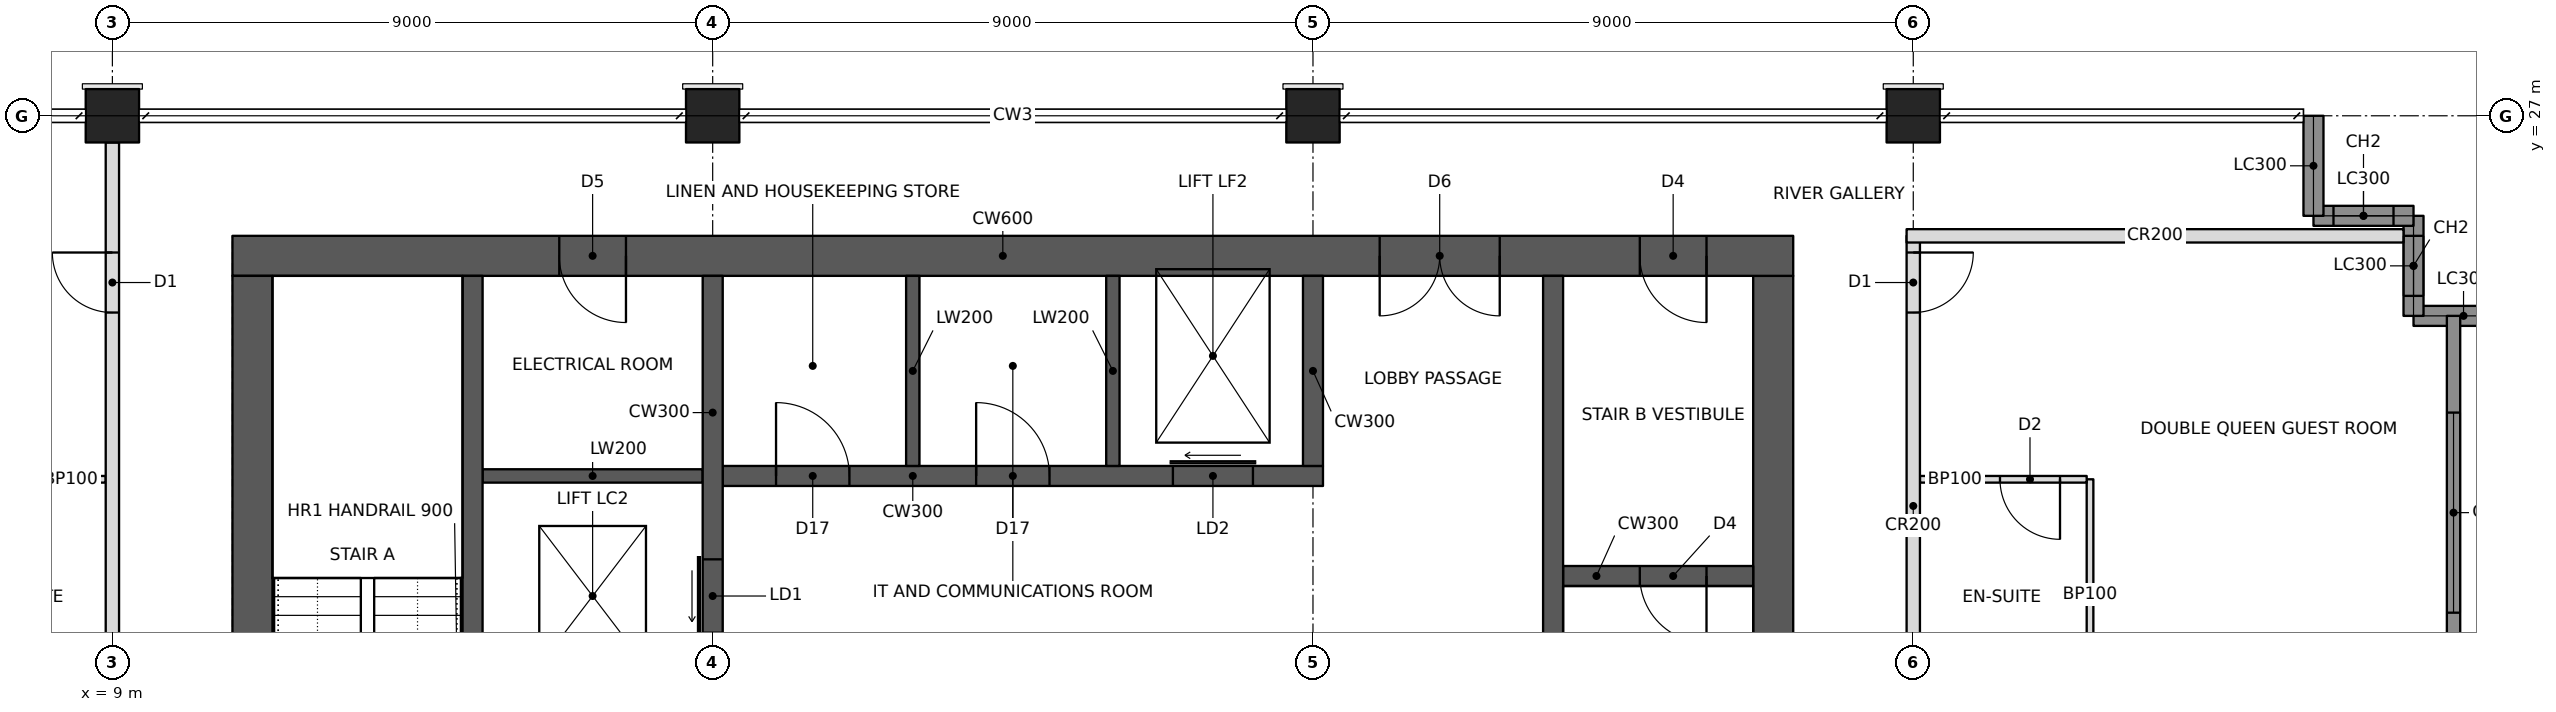
"""IFC4 building model, lengths in metres.
Left out: names, types, materials, properties, quantities, classifications, styles, units other than length and angle.
Written with IfcOpenShell. Run it as: python <this file> out.ifc"""

import sys

from ifc_helpers import new_model, si_unit, direction, frame, frame_2d, origin, origin_2d, place, context, subcontext, project, spatial, rectangle, hollow_rectangle, extrude, element, fill, save


model = new_model("IFC4")
c1 = context("Model", 3, precision=1e-05, world=origin(), true_north=direction((0.0, 1.0)))
c2 = subcontext(c1, "Body", "Model", "MODEL_VIEW")
j1 = project(units=[si_unit("LENGTHUNIT", "METRE"), si_unit("PLANEANGLEUNIT", "RADIAN")], contexts=[c1])
p1 = place(None, origin())
s1 = spatial("IfcSite", under=j1, at=p1, CompositionType="ELEMENT")
p2 = place(p1, origin())
s2 = spatial("IfcBuilding", under=s1, at=p2, CompositionType="ELEMENT")
p3 = place(p2, frame((0.0, 0.0, 201.2)))
s3 = spatial("IfcBuildingStorey", under=s2, at=p3, CompositionType="ELEMENT", Elevation=201.2)
for number, where, z_axis, x_axis in (
    (1, (9.0, 27.0, 0.0), (0.0, 0.0, 1.0), (1.0, 0.0, 0.0)),
    (2, (18.0, 27.0, 0.0), (0.0, 0.0, 1.0), (1.0, 0.0, 0.0)),
    (3, (27.0, 27.0, 0.0), (0.0, 0.0, 1.0), (1.0, 0.0, 0.0)),
    (4, (36.0, 27.0, 0.0), (0.0, 0.0, 1.0), (1.0, 0.0, 0.0)),
):
    element("IfcColumn", number, at=place(p3, frame(where, z_axis=z_axis, x_axis=x_axis)), inside=s3, PredefinedType="COLUMN", context=c2, shape_type="SweptSolid", body=[
        extrude(hollow_rectangle(XDim=0.8, YDim=0.8, WallThickness=0.06, at=origin_2d()), origin(), (0.0, 0.0, 1.0), 3.4),
    ])
p4 = place(p3, frame((10.8, 24.9, 0.0), z_axis=(0.0, 0.0, 1.0), x_axis=(1.0, 0.0, 0.0)))
e5 = element("IfcWall", 5, at=p4, inside=s3, PredefinedType="SHEAR", context=c2, shape_type="SweptSolid", body=[
    extrude(rectangle(XDim=23.4, YDim=0.6, at=frame_2d((11.7, 0.0))), origin(), (0.0, 0.0, 1.0), 3.4),
])
p5 = place(p4, frame((17.2, 0.0, 0.0)))
e6 = element("IfcOpeningElement", 6, at=p5, cuts=e5, PredefinedType="OPENING", context=c2, shape_type="SweptSolid", body=[
    extrude(rectangle(XDim=1.8, YDim=2.1, at=frame_2d((0.9, 1.05))), frame((0.0, 0.31, 0.0), z_axis=(0.0, -1.0, 0.0), x_axis=(1.0, 0.0, 0.0)), (0.0, 0.0, 1.0), 0.62),
])
p6 = place(p4, frame((21.1, 0.0, 0.0)))
e7 = element("IfcOpeningElement", 7, at=p6, cuts=e5, PredefinedType="OPENING", context=c2, shape_type="SweptSolid", body=[
    extrude(rectangle(XDim=1.0, YDim=2.1, at=frame_2d((0.5, 1.05))), frame((0.0, 0.31, 0.0), z_axis=(0.0, -1.0, 0.0), x_axis=(1.0, 0.0, 0.0)), (0.0, 0.0, 1.0), 0.62),
])
p7 = place(p4, frame((4.9, 0.0, 0.0)))
e8 = element("IfcOpeningElement", 8, at=p7, cuts=e5, PredefinedType="OPENING", context=c2, shape_type="SweptSolid", body=[
    extrude(rectangle(XDim=1.0, YDim=2.1, at=frame_2d((0.5, 1.05))), frame((0.0, 0.31, 0.0), z_axis=(0.0, -1.0, 0.0), x_axis=(1.0, 0.0, 0.0)), (0.0, 0.0, 1.0), 0.62),
])
for number, where, z_axis, x_axis in (
    (9, (11.1, 11.4, 0.0), (0.0, 0.0, 1.0), (0.0, 1.0, 0.0)),
    (10, (33.9, 11.4, 0.0), (0.0, 0.0, 1.0), (0.0, 1.0, 0.0)),
):
    element("IfcWall", number, at=place(p3, frame(where, z_axis=z_axis, x_axis=x_axis)), inside=s3, PredefinedType="SHEAR", context=c2, shape_type="SweptSolid", body=[
        extrude(rectangle(XDim=13.2, YDim=0.6, at=frame_2d((6.6, 0.0))), origin(), (0.0, 0.0, 1.0), 3.4),
    ])
p8 = place(p3, frame((14.4, 11.4, 0.0), z_axis=(0.0, 0.0, 1.0), x_axis=(0.0, 1.0, 0.0)))
e11 = element("IfcWall", 11, at=p8, inside=s3, PredefinedType="SHEAR", context=c2, shape_type="SweptSolid", body=[
    extrude(rectangle(XDim=13.2, YDim=0.3, at=frame_2d((6.6, 0.0))), origin(), (0.0, 0.0, 1.0), 3.4),
])
p9 = place(p3, frame((18.0, 11.4, 0.0), z_axis=(0.0, 0.0, 1.0), x_axis=(0.0, 1.0, 0.0)))
e12 = element("IfcWall", 12, at=p9, inside=s3, PredefinedType="SHEAR", context=c2, shape_type="SweptSolid", body=[
    extrude(rectangle(XDim=13.2, YDim=0.3, at=frame_2d((6.6, 0.0))), origin(), (0.0, 0.0, 1.0), 3.4),
])
p10 = place(p9, frame((3.6, 0.0, 0.0)))
e13 = element("IfcOpeningElement", 13, at=p10, cuts=e12, PredefinedType="OPENING", context=c2, shape_type="SweptSolid", body=[
    extrude(rectangle(XDim=1.0, YDim=2.1, at=frame_2d((0.5, 1.05))), frame((0.0, 0.16, 0.0), z_axis=(0.0, -1.0, 0.0), x_axis=(1.0, 0.0, 0.0)), (0.0, 0.0, 1.0), 0.32),
])
p11 = place(p9, frame((7.85, 0.0, 0.0)))
e14 = element("IfcOpeningElement", 14, at=p11, cuts=e12, PredefinedType="OPENING", context=c2, shape_type="SweptSolid", body=[
    extrude(rectangle(XDim=1.1, YDim=2.1, at=frame_2d((0.55, 1.05))), frame((0.0, 0.16, 0.0), z_axis=(0.0, -1.0, 0.0), x_axis=(1.0, 0.0, 0.0)), (0.0, 0.0, 1.0), 0.32),
])
p12 = place(p3, frame((18.15, 21.6, 0.0), z_axis=(0.0, 0.0, 1.0), x_axis=(1.0, 0.0, 0.0)))
e15 = element("IfcWall", 15, at=p12, inside=s3, PredefinedType="SHEAR", context=c2, shape_type="SweptSolid", body=[
    extrude(rectangle(XDim=9.0, YDim=0.3, at=frame_2d((4.5, 0.0))), origin(), (0.0, 0.0, 1.0), 3.4),
])
p13 = place(p12, frame((6.75, 0.0, 0.0)))
e16 = element("IfcOpeningElement", 16, at=p13, cuts=e15, PredefinedType="OPENING", context=c2, shape_type="SweptSolid", body=[
    extrude(rectangle(XDim=1.2, YDim=2.1, at=frame_2d((0.6, 1.05))), frame((0.0, 0.16, 0.0), z_axis=(0.0, -1.0, 0.0), x_axis=(1.0, 0.0, 0.0)), (0.0, 0.0, 1.0), 0.32),
])
p14 = place(p12, frame((0.8, 0.0, 0.0)))
e17 = element("IfcOpeningElement", 17, at=p14, cuts=e15, PredefinedType="OPENING", context=c2, shape_type="SweptSolid", body=[
    extrude(rectangle(XDim=1.1, YDim=2.1, at=frame_2d((0.55, 1.05))), frame((0.0, 0.16, 0.0), z_axis=(0.0, -1.0, 0.0), x_axis=(1.0, 0.0, 0.0)), (0.0, 0.0, 1.0), 0.32),
])
p15 = place(p12, frame((3.8, 0.0, 0.0)))
e18 = element("IfcOpeningElement", 18, at=p15, cuts=e15, PredefinedType="OPENING", context=c2, shape_type="SweptSolid", body=[
    extrude(rectangle(XDim=1.1, YDim=2.1, at=frame_2d((0.55, 1.05))), frame((0.0, 0.16, 0.0), z_axis=(0.0, -1.0, 0.0), x_axis=(1.0, 0.0, 0.0)), (0.0, 0.0, 1.0), 0.32),
])
p16 = place(p3, frame((27.0, 21.75, 0.0), z_axis=(0.0, 0.0, 1.0), x_axis=(0.0, 1.0, 0.0)))
e19 = element("IfcWall", 19, at=p16, inside=s3, PredefinedType="SHEAR", context=c2, shape_type="SweptSolid", body=[
    extrude(rectangle(XDim=2.85, YDim=0.3, at=frame_2d((1.425, 0.0))), origin(), (0.0, 0.0, 1.0), 3.4),
])
for number, where, z_axis, x_axis in (
    (20, (21.0, 21.75, 0.0), (0.0, 0.0, 1.0), (0.0, 1.0, 0.0)),
    (21, (24.0, 21.75, 0.0), (0.0, 0.0, 1.0), (0.0, 1.0, 0.0)),
):
    element("IfcWall", number, at=place(p3, frame(where, z_axis=z_axis, x_axis=x_axis)), inside=s3, PredefinedType="SHEAR", context=c2, shape_type="SweptSolid", body=[
        extrude(rectangle(XDim=2.85, YDim=0.2, at=frame_2d((1.425, 0.0))), origin(), (0.0, 0.0, 1.0), 3.4),
    ])
p17 = place(p3, frame((30.6, 11.4, 0.0), z_axis=(0.0, 0.0, 1.0), x_axis=(0.0, 1.0, 0.0)))
e22 = element("IfcWall", 22, at=p17, inside=s3, PredefinedType="SHEAR", context=c2, shape_type="SweptSolid", body=[
    extrude(rectangle(XDim=13.2, YDim=0.3, at=frame_2d((6.6, 0.0))), origin(), (0.0, 0.0, 1.0), 3.4),
])
p18 = place(p3, frame((30.75, 20.1, 0.0), z_axis=(0.0, 0.0, 1.0), x_axis=(1.0, 0.0, 0.0)))
e23 = element("IfcWall", 23, at=p18, inside=s3, PredefinedType="SHEAR", context=c2, shape_type="SweptSolid", body=[
    extrude(rectangle(XDim=2.85, YDim=0.3, at=frame_2d((1.425, 0.0))), origin(), (0.0, 0.0, 1.0), 3.4),
])
p19 = place(p18, frame((1.15, 0.0, 0.0)))
e24 = element("IfcOpeningElement", 24, at=p19, cuts=e23, PredefinedType="OPENING", context=c2, shape_type="SweptSolid", body=[
    extrude(rectangle(XDim=1.0, YDim=2.1, at=frame_2d((0.5, 1.05))), frame((0.0, 0.16, 0.0), z_axis=(0.0, -1.0, 0.0), x_axis=(1.0, 0.0, 0.0)), (0.0, 0.0, 1.0), 0.32),
])
p20 = place(p3, frame((14.55, 21.6, 0.0), z_axis=(0.0, 0.0, 1.0), x_axis=(1.0, 0.0, 0.0)))
e25 = element("IfcWall", 25, at=p20, inside=s3, PredefinedType="SHEAR", context=c2, shape_type="SweptSolid", body=[
    extrude(rectangle(XDim=3.3, YDim=0.2, at=frame_2d((1.65, 0.0))), origin(), (0.0, 0.0, 1.0), 3.4),
])
p21 = place(p3, frame((45.0, 24.0, 0.0), z_axis=(0.0, 0.0, 1.0), x_axis=(-1.0, 0.0, 0.0)))
e26 = element("IfcWall", 26, at=p21, inside=s3, PredefinedType="SOLIDWALL", context=c2, shape_type="SweptSolid", body=[
    extrude(rectangle(XDim=1.5, YDim=0.3, at=frame_2d((0.75, 0.0))), origin(), (0.0, 0.0, 1.0), 2.42),
])
p22 = place(p3, frame((43.5, 24.0, 0.0), z_axis=(0.0, 0.0, 1.0), x_axis=(0.0, 1.0, 0.0)))
e27 = element("IfcWall", 27, at=p22, inside=s3, PredefinedType="SOLIDWALL", context=c2, shape_type="SweptSolid", body=[
    extrude(rectangle(XDim=1.5, YDim=0.3, at=frame_2d((0.75, 0.0))), origin(), (0.0, 0.0, 1.0), 3.2),
])
p23 = place(p22, frame((0.3, 0.0, 0.6)))
e28 = element("IfcOpeningElement", 28, at=p23, cuts=e27, PredefinedType="OPENING", context=c2, shape_type="SweptSolid", body=[
    extrude(rectangle(XDim=0.9, YDim=2.2, at=frame_2d((0.45, 1.1))), frame((0.0, 0.16, 0.0), z_axis=(0.0, -1.0, 0.0), x_axis=(1.0, 0.0, 0.0)), (0.0, 0.0, 1.0), 0.32),
])
p24 = place(p3, frame((43.5, 25.5, 0.0), z_axis=(0.0, 0.0, 1.0), x_axis=(-1.0, 0.0, 0.0)))
e29 = element("IfcWall", 29, at=p24, inside=s3, PredefinedType="SOLIDWALL", context=c2, shape_type="SweptSolid", body=[
    extrude(rectangle(XDim=1.5, YDim=0.3, at=frame_2d((0.75, 0.0))), origin(), (0.0, 0.0, 1.0), 3.2),
])
p25 = place(p24, frame((0.3, 0.0, 0.6)))
e30 = element("IfcOpeningElement", 30, at=p25, cuts=e29, PredefinedType="OPENING", context=c2, shape_type="SweptSolid", body=[
    extrude(rectangle(XDim=0.9, YDim=2.2, at=frame_2d((0.45, 1.1))), frame((0.0, 0.16, 0.0), z_axis=(0.0, -1.0, 0.0), x_axis=(1.0, 0.0, 0.0)), (0.0, 0.0, 1.0), 0.32),
])
p26 = place(p3, frame((42.0, 25.5, 0.0), z_axis=(0.0, 0.0, 1.0), x_axis=(0.0, 1.0, 0.0)))
e31 = element("IfcWall", 31, at=p26, inside=s3, PredefinedType="SOLIDWALL", context=c2, shape_type="SweptSolid", body=[
    extrude(rectangle(XDim=1.5, YDim=0.3, at=frame_2d((0.75, 0.0))), origin(), (0.0, 0.0, 1.0), 2.42),
])
p27 = place(p3, frame((9.0, 18.4, 0.0), z_axis=(0.0, 0.0, 1.0), x_axis=(0.0, 1.0, 0.0)))
e32 = element("IfcWall", 32, at=p27, inside=s3, PredefinedType="PARTITIONING", context=c2, shape_type="SweptSolid", body=[
    extrude(rectangle(XDim=8.2, YDim=0.2, at=frame_2d((4.1, 0.0))), origin(), (0.0, 0.0, 1.0), 2.405),
])
p28 = place(p27, frame((5.65, 0.0, 0.0)))
e33 = element("IfcOpeningElement", 33, at=p28, cuts=e32, PredefinedType="OPENING", context=c2, shape_type="SweptSolid", body=[
    extrude(rectangle(XDim=0.9, YDim=2.1, at=frame_2d((0.45, 1.05))), frame((0.0, 0.11, 0.0), z_axis=(0.0, -1.0, 0.0), x_axis=(1.0, 0.0, 0.0)), (0.0, 0.0, 1.0), 0.22),
])
p29 = place(p3, frame((36.0, 18.4, 0.0), z_axis=(0.0, 0.0, 1.0), x_axis=(0.0, 1.0, 0.0)))
e34 = element("IfcWall", 34, at=p29, inside=s3, PredefinedType="PARTITIONING", context=c2, shape_type="SweptSolid", body=[
    extrude(rectangle(XDim=6.8, YDim=0.2, at=frame_2d((3.4, 0.0))), origin(), (0.0, 0.0, 1.0), 2.405),
])
p30 = place(p29, frame((5.65, 0.0, 0.0)))
e35 = element("IfcOpeningElement", 35, at=p30, cuts=e34, PredefinedType="OPENING", context=c2, shape_type="SweptSolid", body=[
    extrude(rectangle(XDim=0.9, YDim=2.1, at=frame_2d((0.45, 1.05))), frame((0.0, 0.11, 0.0), z_axis=(0.0, -1.0, 0.0), x_axis=(1.0, 0.0, 0.0)), (0.0, 0.0, 1.0), 0.22),
])
p31 = place(p3, frame((35.9, 25.2, 0.0), z_axis=(0.0, 0.0, 1.0), x_axis=(1.0, 0.0, 0.0)))
e36 = element("IfcWall", 36, at=p31, inside=s3, PredefinedType="PARTITIONING", context=c2, shape_type="SweptSolid", body=[
    extrude(rectangle(XDim=7.45, YDim=0.2, at=frame_2d((3.725, 0.0))), origin(), (0.0, 0.0, 1.0), 2.404),
])
p32 = place(p3, frame((8.9, 21.55, 0.0), z_axis=(0.0, 0.0, 1.0), x_axis=(-1.0, 0.0, 0.0)))
e37 = element("IfcWall", 37, at=p32, inside=s3, PredefinedType="PARTITIONING", context=c2, shape_type="SweptSolid", body=[
    extrude(rectangle(XDim=2.5, YDim=0.1, at=frame_2d((1.25, 0.0))), origin(), (0.0, 0.0, 1.0), 2.404),
])
p33 = place(p32, frame((1.2, 0.0, 0.0)))
e38 = element("IfcOpeningElement", 38, at=p33, cuts=e37, PredefinedType="OPENING", context=c2, shape_type="SweptSolid", body=[
    extrude(rectangle(XDim=0.9, YDim=2.1, at=frame_2d((0.45, 1.05))), frame((0.0, 0.06, 0.0), z_axis=(0.0, -1.0, 0.0), x_axis=(1.0, 0.0, 0.0)), (0.0, 0.0, 1.0), 0.12),
])
p34 = place(p3, frame((38.65, 18.1, 0.0), z_axis=(0.0, 0.0, 1.0), x_axis=(0.0, 1.0, 0.0)))
e39 = element("IfcWall", 39, at=p34, inside=s3, PredefinedType="PARTITIONING", context=c2, shape_type="SweptSolid", body=[
    extrude(rectangle(XDim=3.45, YDim=0.1, at=frame_2d((1.725, 0.0))), origin(), (0.0, 0.0, 1.0), 2.404),
])
p35 = place(p3, frame((36.1, 21.55, 0.0), z_axis=(0.0, 0.0, 1.0), x_axis=(1.0, 0.0, 0.0)))
e40 = element("IfcWall", 40, at=p35, inside=s3, PredefinedType="PARTITIONING", context=c2, shape_type="SweptSolid", body=[
    extrude(rectangle(XDim=2.5, YDim=0.1, at=frame_2d((1.25, 0.0))), origin(), (0.0, 0.0, 1.0), 2.404),
])
p36 = place(p35, frame((1.2, 0.0, 0.0)))
e41 = element("IfcOpeningElement", 41, at=p36, cuts=e40, PredefinedType="OPENING", context=c2, shape_type="SweptSolid", body=[
    extrude(rectangle(XDim=0.9, YDim=2.1, at=frame_2d((0.45, 1.05))), frame((0.0, 0.06, 0.0), z_axis=(0.0, -1.0, 0.0), x_axis=(1.0, 0.0, 0.0)), (0.0, 0.0, 1.0), 0.12),
])
p37 = place(p3, frame((44.1, 18.194, 0.0), z_axis=(0.0, 0.0, 1.0), x_axis=(0.0, 1.0, 0.0)))
e42 = element("IfcWall", 42, at=p37, inside=s3, PredefinedType="SOLIDWALL", context=c2, shape_type="SweptSolid", body=[
    extrude(rectangle(XDim=5.806, YDim=0.2, at=frame_2d((2.903, 0.0))), origin(), (0.0, 0.0, 1.0), 3.2),
])
p38 = place(p37, frame((1.356, 0.0, 0.6)))
e43 = element("IfcOpeningElement", 43, at=p38, cuts=e42, PredefinedType="OPENING", context=c2, shape_type="SweptSolid", body=[
    extrude(rectangle(XDim=3.0, YDim=2.2, at=frame_2d((1.5, 1.1))), frame((0.0, 0.11, 0.0), z_axis=(0.0, -1.0, 0.0), x_axis=(1.0, 0.0, 0.0)), (0.0, 0.0, 1.0), 0.22),
])
p39 = place(p23, origin())
e44 = element("IfcWindow", 44, at=p39, inside=s3, PartitioningType="SINGLE_PANEL", PredefinedType="WINDOW", context=c2, shape_type="SweptSolid", body=[
    extrude(rectangle(XDim=0.9, YDim=2.2, at=frame_2d((0.45, 1.1))), frame((0.0, 0.03, 0.0), z_axis=(0.0, -1.0, 0.0), x_axis=(1.0, 0.0, 0.0)), (0.0, 0.0, 1.0), 0.06),
])
fill(e28, e44)
p40 = place(p25, origin())
e45 = element("IfcWindow", 45, at=p40, inside=s3, PartitioningType="SINGLE_PANEL", PredefinedType="WINDOW", context=c2, shape_type="SweptSolid", body=[
    extrude(rectangle(XDim=0.9, YDim=2.2, at=frame_2d((0.45, 1.1))), frame((0.0, 0.03, 0.0), z_axis=(0.0, -1.0, 0.0), x_axis=(1.0, 0.0, 0.0)), (0.0, 0.0, 1.0), 0.06),
])
fill(e30, e45)
p41 = place(p38, origin())
e46 = element("IfcWindow", 46, at=p41, inside=s3, PartitioningType="TRIPLE_PANEL_VERTICAL", PredefinedType="WINDOW", context=c2, shape_type="SweptSolid", body=[
    extrude(rectangle(XDim=3.0, YDim=2.2, at=frame_2d((1.5, 1.1))), frame((0.0, 0.03, 0.0), z_axis=(0.0, -1.0, 0.0), x_axis=(1.0, 0.0, 0.0)), (0.0, 0.0, 1.0), 0.06),
])
fill(e43, e46)
p42 = place(p28, origin())
e47 = element("IfcDoor", 47, at=p42, inside=s3, OperationType="SINGLE_SWING_RIGHT", PredefinedType="DOOR", context=c2, shape_type="SweptSolid", body=[
    extrude(rectangle(XDim=0.9, YDim=2.1, at=frame_2d((0.45, 1.05))), frame((0.0, 0.025, 0.0), z_axis=(0.0, -1.0, 0.0), x_axis=(1.0, 0.0, 0.0)), (0.0, 0.0, 1.0), 0.05),
])
fill(e33, e47)
p43 = place(p36, frame((0.9, 0.0, 0.0), z_axis=(0.0, 0.0, 1.0), x_axis=(-1.0, 0.0, 0.0)))
e48 = element("IfcDoor", 48, at=p43, inside=s3, OperationType="SINGLE_SWING_LEFT", PredefinedType="DOOR", context=c2, shape_type="SweptSolid", body=[
    extrude(rectangle(XDim=0.9, YDim=2.1, at=frame_2d((0.45, 1.05))), frame((0.0, 0.025, 0.0), z_axis=(0.0, -1.0, 0.0), x_axis=(1.0, 0.0, 0.0)), (0.0, 0.0, 1.0), 0.05),
])
fill(e41, e48)
p44 = place(p30, frame((0.9, 0.0, 0.0), z_axis=(0.0, 0.0, 1.0), x_axis=(-1.0, 0.0, 0.0)))
e49 = element("IfcDoor", 49, at=p44, inside=s3, OperationType="SINGLE_SWING_LEFT", PredefinedType="DOOR", context=c2, shape_type="SweptSolid", body=[
    extrude(rectangle(XDim=0.9, YDim=2.1, at=frame_2d((0.45, 1.05))), frame((0.0, 0.025, 0.0), z_axis=(0.0, -1.0, 0.0), x_axis=(1.0, 0.0, 0.0)), (0.0, 0.0, 1.0), 0.05),
])
fill(e35, e49)
p45 = place(p5, frame((1.8, 0.0, 0.0), z_axis=(0.0, 0.0, 1.0), x_axis=(-1.0, 0.0, 0.0)))
e50 = element("IfcDoor", 50, at=p45, inside=s3, OperationType="DOUBLE_DOOR_SINGLE_SWING", PredefinedType="DOOR", context=c2, shape_type="SweptSolid", body=[
    extrude(rectangle(XDim=1.8, YDim=2.1, at=frame_2d((0.9, 1.05))), frame((0.0, 0.025, 0.0), z_axis=(0.0, -1.0, 0.0), x_axis=(1.0, 0.0, 0.0)), (0.0, 0.0, 1.0), 0.05),
])
fill(e6, e50)
p46 = place(p6, frame((1.0, 0.0, 0.0), z_axis=(0.0, 0.0, 1.0), x_axis=(-1.0, 0.0, 0.0)))
e51 = element("IfcDoor", 51, at=p46, inside=s3, OperationType="SINGLE_SWING_LEFT", PredefinedType="DOOR", context=c2, shape_type="SweptSolid", body=[
    extrude(rectangle(XDim=1.0, YDim=2.1, at=frame_2d((0.5, 1.05))), frame((0.0, 0.025, 0.0), z_axis=(0.0, -1.0, 0.0), x_axis=(1.0, 0.0, 0.0)), (0.0, 0.0, 1.0), 0.05),
])
fill(e7, e51)
p47 = place(p19, frame((1.0, 0.0, 0.0), z_axis=(0.0, 0.0, 1.0), x_axis=(-1.0, 0.0, 0.0)))
e52 = element("IfcDoor", 52, at=p47, inside=s3, OperationType="SINGLE_SWING_LEFT", PredefinedType="DOOR", context=c2, shape_type="SweptSolid", body=[
    extrude(rectangle(XDim=1.0, YDim=2.1, at=frame_2d((0.5, 1.05))), frame((0.0, 0.025, 0.0), z_axis=(0.0, -1.0, 0.0), x_axis=(1.0, 0.0, 0.0)), (0.0, 0.0, 1.0), 0.05),
])
fill(e24, e52)
p48 = place(p7, frame((1.0, 0.0, 0.0), z_axis=(0.0, 0.0, 1.0), x_axis=(-1.0, 0.0, 0.0)))
e53 = element("IfcDoor", 53, at=p48, inside=s3, OperationType="SINGLE_SWING_LEFT", PredefinedType="DOOR", context=c2, shape_type="SweptSolid", body=[
    extrude(rectangle(XDim=1.0, YDim=2.1, at=frame_2d((0.5, 1.05))), frame((0.0, 0.025, 0.0), z_axis=(0.0, -1.0, 0.0), x_axis=(1.0, 0.0, 0.0)), (0.0, 0.0, 1.0), 0.05),
])
fill(e8, e53)
p49 = place(p11, origin())
e54 = element("IfcDoor", 54, at=p49, inside=s3, OperationType="SLIDING_TO_LEFT", PredefinedType="DOOR", context=c2, shape_type="SweptSolid", body=[
    extrude(rectangle(XDim=1.1, YDim=2.1, at=frame_2d((0.55, 1.05))), frame((0.0, 0.025, 0.0), z_axis=(0.0, -1.0, 0.0), x_axis=(1.0, 0.0, 0.0)), (0.0, 0.0, 1.0), 0.05),
])
fill(e14, e54)
p50 = place(p13, origin())
e55 = element("IfcDoor", 55, at=p50, inside=s3, OperationType="SLIDING_TO_LEFT", PredefinedType="DOOR", context=c2, shape_type="SweptSolid", body=[
    extrude(rectangle(XDim=1.2, YDim=2.1, at=frame_2d((0.6, 1.05))), frame((0.0, 0.025, 0.0), z_axis=(0.0, -1.0, 0.0), x_axis=(1.0, 0.0, 0.0)), (0.0, 0.0, 1.0), 0.05),
])
fill(e16, e55)
p51 = place(p14, origin())
e56 = element("IfcDoor", 56, at=p51, inside=s3, OperationType="SINGLE_SWING_LEFT", PredefinedType="DOOR", context=c2, shape_type="SweptSolid", body=[
    extrude(rectangle(XDim=1.1, YDim=2.1, at=frame_2d((0.55, 1.05))), frame((0.0, 0.025, 0.0), z_axis=(0.0, -1.0, 0.0), x_axis=(1.0, 0.0, 0.0)), (0.0, 0.0, 1.0), 0.05),
])
fill(e17, e56)
p52 = place(p15, origin())
e57 = element("IfcDoor", 57, at=p52, inside=s3, OperationType="SINGLE_SWING_LEFT", PredefinedType="DOOR", context=c2, shape_type="SweptSolid", body=[
    extrude(rectangle(XDim=1.1, YDim=2.1, at=frame_2d((0.55, 1.05))), frame((0.0, 0.025, 0.0), z_axis=(0.0, -1.0, 0.0), x_axis=(1.0, 0.0, 0.0)), (0.0, 0.0, 1.0), 0.05),
])
fill(e18, e57)
save(model, sys.argv[1])
